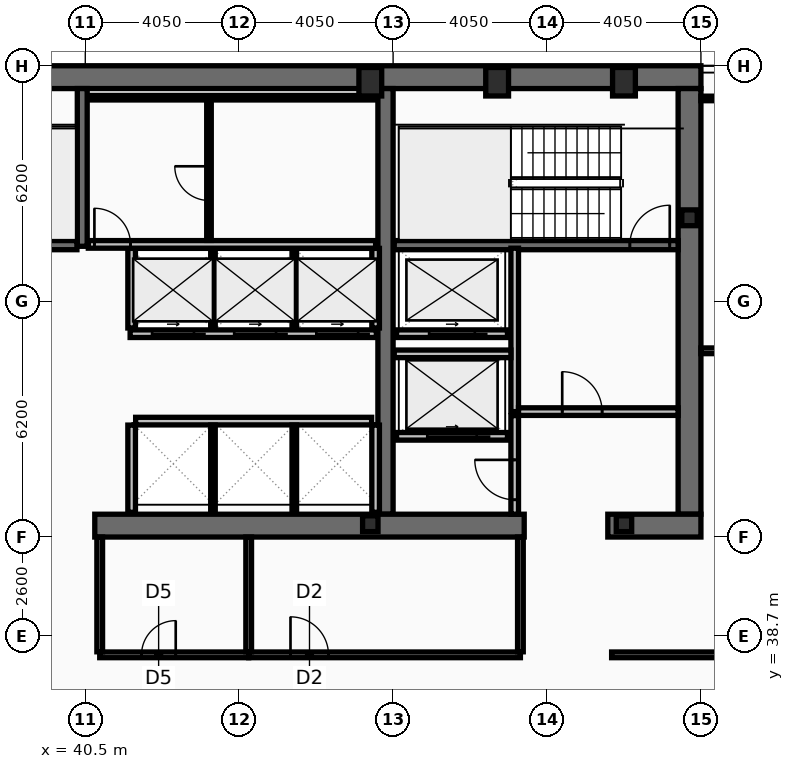
"""IFC4 building model, lengths in metres.
Left out: names, types, materials, properties, quantities, classifications, styles, units other than length and angle.
Written with IfcOpenShell. Run it as: python <this file> out.ifc"""

import sys

from ifc_helpers import new_model, si_unit, direction, frame, frame_2d, origin, origin_2d, place, context, subcontext, project, spatial, rectangle, hollow_rectangle, i_section, extrude, element, fill, save


model = new_model("IFC4")
c1 = context("Model", 3, precision=1e-05, world=origin(), true_north=direction((0.0, 1.0)))
c2 = subcontext(c1, "Body", "Model", "MODEL_VIEW")
j1 = project(units=[si_unit("LENGTHUNIT", "METRE"), si_unit("PLANEANGLEUNIT", "RADIAN")], contexts=[c1])
p1 = place(None, origin())
s1 = spatial("IfcSite", under=j1, at=p1, CompositionType="ELEMENT")
p2 = place(p1, origin())
s2 = spatial("IfcBuilding", under=s1, at=p2, CompositionType="ELEMENT")
p3 = place(p2, frame((0.0, 0.0, 195.8)))
s3 = spatial("IfcBuildingStorey", under=s2, at=p3, CompositionType="ELEMENT", Elevation=195.8)
p4 = place(p3, frame((16.2, 53.4, 0.0), z_axis=(0.0, 0.0, 1.0), x_axis=(1.0, 0.0, 0.0)))
e1 = element("IfcWall", 1, at=p4, inside=s3, PredefinedType="SHEAR", context=c2, shape_type="SweptSolid", body=[
    extrude(rectangle(XDim=40.5, YDim=0.6, at=frame_2d((20.25, 0.0))), origin(), (0.0, 0.0, 1.0), 3.44),
])
p5 = place(p3, frame((56.4, 53.1, 0.0), z_axis=(0.0, 0.0, 1.0), x_axis=(0.0, -1.0, 0.0)))
e2 = element("IfcWall", 2, at=p5, inside=s3, PredefinedType="SHEAR", context=c2, shape_type="SweptSolid", body=[
    extrude(rectangle(XDim=11.2, YDim=0.6, at=frame_2d((5.6, 0.0))), origin(), (0.0, 0.0, 1.0), 3.44),
])
p6 = place(p3, frame((48.4, 41.9, 0.0), z_axis=(0.0, 0.0, 1.0), x_axis=(0.0, 1.0, 0.0)))
e3 = element("IfcWall", 3, at=p6, inside=s3, PredefinedType="SHEAR", context=c2, shape_type="SweptSolid", body=[
    extrude(rectangle(XDim=11.2, YDim=0.4, at=frame_2d((5.6, 0.0))), origin(), (0.0, 0.0, 1.0), 3.44),
])
p7 = place(p3, frame((52.05, 41.6, 0.0), z_axis=(0.0, 0.0, 1.0), x_axis=(-1.0, 0.0, 0.0)))
e4 = element("IfcWall", 4, at=p7, inside=s3, PredefinedType="SHEAR", context=c2, shape_type="SweptSolid", body=[
    extrude(rectangle(XDim=11.3, YDim=0.6, at=frame_2d((5.65, 0.0))), origin(), (0.0, 0.0, 1.0), 3.44),
])
p8 = place(p3, frame((56.7, 41.6, 0.0), z_axis=(0.0, 0.0, 1.0), x_axis=(-1.0, 0.0, 0.0)))
e5 = element("IfcWall", 5, at=p8, inside=s3, PredefinedType="SHEAR", context=c2, shape_type="SweptSolid", body=[
    extrude(rectangle(XDim=2.45, YDim=0.6, at=frame_2d((1.225, 0.0))), origin(), (0.0, 0.0, 1.0), 3.44),
])
p9 = place(p3, frame((40.42, 48.95, 0.0), z_axis=(0.0, 0.0, 1.0), x_axis=(0.0, 1.0, 0.0)))
e6 = element("IfcWall", 6, at=p9, inside=s3, PredefinedType="SHEAR", context=c2, shape_type="SweptSolid", body=[
    extrude(rectangle(XDim=4.15, YDim=0.26, at=frame_2d((2.075, 0.0))), origin(), (0.0, 0.0, 1.0), 3.44),
])
p10 = place(p3, frame((48.63, 48.98, 0.0), z_axis=(0.0, 0.0, 1.0), x_axis=(1.0, 0.0, 0.0)))
e7 = element("IfcWall", 7, at=p10, inside=s3, PredefinedType="SHEAR", context=c2, shape_type="SweptSolid", body=[
    extrude(rectangle(XDim=7.47, YDim=0.24, at=frame_2d((3.735, 0.0))), origin(), (0.0, 0.0, 1.0), 3.44),
])
p11 = place(p10, frame((6.2, 0.0, 0.0)))
e8 = element("IfcOpeningElement", 8, at=p11, cuts=e7, PredefinedType="OPENING", context=c2, shape_type="SweptSolid", body=[
    extrude(rectangle(XDim=1.05, YDim=2.15, at=frame_2d((0.525, 1.075))), frame((0.0, 0.13, 0.0), z_axis=(0.0, -1.0, 0.0), x_axis=(1.0, 0.0, 0.0)), (0.0, 0.0, 1.0), 0.26),
])
p12 = place(p3, frame((32.72, 48.98, 0.0), z_axis=(0.0, 0.0, 1.0), x_axis=(1.0, 0.0, 0.0)))
e9 = element("IfcWall", 9, at=p12, inside=s3, PredefinedType="SHEAR", context=c2, shape_type="SweptSolid", body=[
    extrude(rectangle(XDim=7.56, YDim=0.24, at=frame_2d((3.78, 0.0))), origin(), (0.0, 0.0, 1.0), 3.44),
])
p13 = place(p12, frame((0.22, 0.0, 0.0)))
e10 = element("IfcOpeningElement", 10, at=p13, cuts=e9, PredefinedType="OPENING", context=c2, shape_type="SweptSolid", body=[
    extrude(rectangle(XDim=1.05, YDim=2.15, at=frame_2d((0.525, 1.075))), frame((0.0, 0.13, 0.0), z_axis=(0.0, -1.0, 0.0), x_axis=(1.0, 0.0, 0.0)), (0.0, 0.0, 1.0), 0.26),
])
for number, where, z_axis, x_axis in (
    (11, (48.0, 53.28, 0.0), (0.0, 0.0, 1.0), (1.0, 0.0, 0.0)),
    (12, (51.337, 53.28, 0.0), (0.0, 0.0, 1.0), (1.0, 0.0, 0.0)),
    (13, (54.675, 53.28, 0.0), (0.0, 0.0, 1.0), (1.0, 0.0, 0.0)),
):
    element("IfcColumn", number, at=place(p3, frame(where, z_axis=z_axis, x_axis=x_axis)), inside=s3, PredefinedType="COLUMN", context=c2, shape_type="SweptSolid", body=[
        extrude(hollow_rectangle(XDim=0.6, YDim=0.75, WallThickness=0.045, at=origin_2d()), origin(), (0.0, 0.0, 1.0), 3.6),
    ])
for number, where, z_axis, x_axis in (
    (14, (56.4, 49.7, 0.0), (0.0, 0.0, 1.0), (1.0, 0.0, 0.0)),
    (15, (48.0, 41.65, 0.0), (0.0, 0.0, 1.0), (1.0, 0.0, 0.0)),
    (16, (54.675, 41.65, 0.0), (0.0, 0.0, 1.0), (1.0, 0.0, 0.0)),
):
    element("IfcColumn", number, at=place(p3, frame(where, z_axis=z_axis, x_axis=x_axis)), inside=s3, PredefinedType="COLUMN", context=c2, shape_type="SweptSolid", body=[
        extrude(i_section(OverallWidth=0.406, OverallDepth=0.416, WebThickness=0.03, FlangeThickness=0.048, at=origin_2d()), origin(), (0.0, 0.0, 1.0), 3.6),
    ])
p14 = place(p3, frame((51.61, 43.95, 0.0), z_axis=(0.0, 0.0, 1.0), x_axis=(-1.0, 0.0, 0.0)))
e17 = element("IfcWall", 17, at=p14, inside=s3, PredefinedType="PARTITIONING", context=c2, shape_type="SweptSolid", body=[
    extrude(rectangle(XDim=2.92, YDim=0.2, at=frame_2d((1.46, 0.0))), origin(), (0.0, 0.0, 1.0), 3.44),
])
p15 = place(p14, frame((0.81, 0.0, 0.0)))
e18 = element("IfcOpeningElement", 18, at=p15, cuts=e17, PredefinedType="OPENING", context=c2, shape_type="SweptSolid", body=[
    extrude(rectangle(XDim=1.3, YDim=2.18, at=frame_2d((0.65, 1.09))), frame((0.0, 0.11, 0.0), z_axis=(0.0, -1.0, 0.0), x_axis=(1.0, 0.0, 0.0)), (0.0, 0.0, 1.0), 0.22),
])
p16 = place(p3, frame((51.61, 46.65, 0.0), z_axis=(0.0, 0.0, 1.0), x_axis=(-1.0, 0.0, 0.0)))
e19 = element("IfcWall", 19, at=p16, inside=s3, PredefinedType="PARTITIONING", context=c2, shape_type="SweptSolid", body=[
    extrude(rectangle(XDim=2.92, YDim=0.2, at=frame_2d((1.46, 0.0))), origin(), (0.0, 0.0, 1.0), 3.44),
])
p17 = place(p16, frame((0.86, 0.0, 0.0)))
e20 = element("IfcOpeningElement", 20, at=p17, cuts=e19, PredefinedType="OPENING", context=c2, shape_type="SweptSolid", body=[
    extrude(rectangle(XDim=1.2, YDim=2.18, at=frame_2d((0.6, 1.09))), frame((0.0, 0.11, 0.0), z_axis=(0.0, -1.0, 0.0), x_axis=(1.0, 0.0, 0.0)), (0.0, 0.0, 1.0), 0.22),
])
p18 = place(p3, frame((48.16, 46.65, 0.0), z_axis=(0.0, 0.0, 1.0), x_axis=(-1.0, 0.0, 0.0)))
e21 = element("IfcWall", 21, at=p18, inside=s3, PredefinedType="PARTITIONING", context=c2, shape_type="SweptSolid", body=[
    extrude(rectangle(XDim=6.48, YDim=0.2, at=frame_2d((3.24, 0.0))), origin(), (0.0, 0.0, 1.0), 3.44),
])
p19 = place(p18, frame((4.8, 0.0, 0.0)))
e22 = element("IfcOpeningElement", 22, at=p19, cuts=e21, PredefinedType="OPENING", context=c2, shape_type="SweptSolid", body=[
    extrude(rectangle(XDim=1.1, YDim=2.18, at=frame_2d((0.55, 1.09))), frame((0.0, 0.11, 0.0), z_axis=(0.0, -1.0, 0.0), x_axis=(1.0, 0.0, 0.0)), (0.0, 0.0, 1.0), 0.22),
])
p20 = place(p18, frame((2.64, 0.0, 0.0)))
e23 = element("IfcOpeningElement", 23, at=p20, cuts=e21, PredefinedType="OPENING", context=c2, shape_type="SweptSolid", body=[
    extrude(rectangle(XDim=1.1, YDim=2.18, at=frame_2d((0.55, 1.09))), frame((0.0, 0.11, 0.0), z_axis=(0.0, -1.0, 0.0), x_axis=(1.0, 0.0, 0.0)), (0.0, 0.0, 1.0), 0.22),
])
p21 = place(p18, frame((0.48, 0.0, 0.0)))
e24 = element("IfcOpeningElement", 24, at=p21, cuts=e21, PredefinedType="OPENING", context=c2, shape_type="SweptSolid", body=[
    extrude(rectangle(XDim=1.1, YDim=2.18, at=frame_2d((0.55, 1.09))), frame((0.0, 0.11, 0.0), z_axis=(0.0, -1.0, 0.0), x_axis=(1.0, 0.0, 0.0)), (0.0, 0.0, 1.0), 0.22),
])
p22 = place(p3, frame((51.8, 44.6, 0.0), z_axis=(0.0, 0.0, 1.0), x_axis=(0.0, 1.0, 0.0)))
e25 = element("IfcWall", 25, at=p22, inside=s3, PredefinedType="PARTITIONING", context=c2, shape_type="SweptSolid", body=[
    extrude(rectangle(XDim=4.3, YDim=0.2, at=frame_2d((2.15, 0.0))), origin(), (0.0, 0.0, 1.0), 3.44),
])
p23 = place(p3, frame((51.9, 44.6, 0.0), z_axis=(0.0, 0.0, 1.0), x_axis=(1.0, 0.0, 0.0)))
e26 = element("IfcWall", 26, at=p23, inside=s3, PredefinedType="PARTITIONING", context=c2, shape_type="SweptSolid", body=[
    extrude(rectangle(XDim=4.2, YDim=0.2, at=frame_2d((2.1, 0.0))), origin(), (0.0, 0.0, 1.0), 3.44),
])
p24 = place(p23, frame((1.15, 0.0, 0.0)))
e27 = element("IfcOpeningElement", 27, at=p24, cuts=e26, PredefinedType="OPENING", context=c2, shape_type="SweptSolid", body=[
    extrude(rectangle(XDim=1.05, YDim=2.15, at=frame_2d((0.525, 1.075))), frame((0.0, 0.11, 0.0), z_axis=(0.0, -1.0, 0.0), x_axis=(1.0, 0.0, 0.0)), (0.0, 0.0, 1.0), 0.22),
])
p25 = place(p3, frame((48.63, 46.12, 0.0), z_axis=(0.0, 0.0, 1.0), x_axis=(1.0, 0.0, 0.0)))
e28 = element("IfcWall", 28, at=p25, inside=s3, PredefinedType="PARTITIONING", context=c2, shape_type="SweptSolid", body=[
    extrude(rectangle(XDim=3.07, YDim=0.2, at=frame_2d((1.535, 0.0))), origin(), (0.0, 0.0, 1.0), 3.44),
])
p26 = place(p3, frame((51.8, 41.9, 0.0), z_axis=(0.0, 0.0, 1.0), x_axis=(0.0, 1.0, 0.0)))
e29 = element("IfcWall", 29, at=p26, inside=s3, PredefinedType="PARTITIONING", context=c2, shape_type="SweptSolid", body=[
    extrude(rectangle(XDim=2.595, YDim=0.2, at=frame_2d((1.298, 0.0))), origin(), (0.0, 0.0, 1.0), 3.44),
])
p27 = place(p26, frame((0.38, 0.0, 0.0)))
e30 = element("IfcOpeningElement", 30, at=p27, cuts=e29, PredefinedType="OPENING", context=c2, shape_type="SweptSolid", body=[
    extrude(rectangle(XDim=1.05, YDim=2.15, at=frame_2d((0.525, 1.075))), frame((0.0, 0.11, 0.0), z_axis=(0.0, -1.0, 0.0), x_axis=(1.0, 0.0, 0.0)), (0.0, 0.0, 1.0), 0.22),
])
for number, where, z_axis, x_axis in (
    (31, (41.72, 46.8, 0.0), (0.0, 0.0, 1.0), (0.0, 1.0, 0.0)),
    (32, (48.14, 46.8, 0.0), (0.0, 0.0, 1.0), (0.0, 1.0, 0.0)),
):
    element("IfcWall", number, at=place(p3, frame(where, z_axis=z_axis, x_axis=x_axis)), inside=s3, PredefinedType="PARTITIONING", context=c2, shape_type="SweptSolid", body=[
        extrude(rectangle(XDim=2.095, YDim=0.2, at=frame_2d((1.047, 0.0))), origin(), (0.0, 0.0, 1.0), 3.44),
    ])
for number, where, z_axis, x_axis in (
    (33, (43.86, 46.8, 0.0), (0.0, 0.0, 1.0), (0.0, 1.0, 0.0)),
    (34, (46.0, 46.8, 0.0), (0.0, 0.0, 1.0), (0.0, 1.0, 0.0)),
):
    element("IfcWall", number, at=place(p3, frame(where, z_axis=z_axis, x_axis=x_axis)), inside=s3, PredefinedType="PARTITIONING", context=c2, shape_type="SweptSolid", body=[
        extrude(rectangle(XDim=2.095, YDim=0.12, at=frame_2d((1.047, 0.0))), origin(), (0.0, 0.0, 1.0), 3.44),
    ])
p28 = place(p3, frame((41.825, 44.35, 0.0), z_axis=(0.0, 0.0, 1.0), x_axis=(1.0, 0.0, 0.0)))
e35 = element("IfcWall", 35, at=p28, inside=s3, PredefinedType="PARTITIONING", context=c2, shape_type="SweptSolid", body=[
    extrude(rectangle(XDim=6.21, YDim=0.2, at=frame_2d((3.105, 0.0))), origin(), (0.0, 0.0, 1.0), 3.44),
])
for number, where, z_axis, x_axis in (
    (36, (41.72, 41.95, 0.0), (0.0, 0.0, 1.0), (0.0, 1.0, 0.0)),
    (37, (48.14, 41.95, 0.0), (0.0, 0.0, 1.0), (0.0, 1.0, 0.0)),
):
    element("IfcWall", number, at=place(p3, frame(where, z_axis=z_axis, x_axis=x_axis)), inside=s3, PredefinedType="PARTITIONING", context=c2, shape_type="SweptSolid", body=[
        extrude(rectangle(XDim=2.295, YDim=0.2, at=frame_2d((1.147, 0.0))), origin(), (0.0, 0.0, 1.0), 3.44),
    ])
for number, where, z_axis, x_axis in (
    (38, (43.86, 41.95, 0.0), (0.0, 0.0, 1.0), (0.0, 1.0, 0.0)),
    (39, (46.0, 41.95, 0.0), (0.0, 0.0, 1.0), (0.0, 1.0, 0.0)),
):
    element("IfcWall", number, at=place(p3, frame(where, z_axis=z_axis, x_axis=x_axis)), inside=s3, PredefinedType="PARTITIONING", context=c2, shape_type="SweptSolid", body=[
        extrude(rectangle(XDim=2.295, YDim=0.12, at=frame_2d((1.147, 0.0))), origin(), (0.0, 0.0, 1.0), 3.44),
    ])
p29 = place(p3, frame((40.58, 52.86, 0.0), z_axis=(0.0, 0.0, 1.0), x_axis=(1.0, 0.0, 0.0)))
e40 = element("IfcWall", 40, at=p29, inside=s3, PredefinedType="PARTITIONING", context=c2, shape_type="SweptSolid", body=[
    extrude(rectangle(XDim=7.56, YDim=0.12, at=frame_2d((3.78, 0.0))), origin(), (0.0, 0.0, 1.0), 3.44),
])
p30 = place(p3, frame((40.58, 49.0, 0.0), z_axis=(0.0, 0.0, 1.0), x_axis=(1.0, 0.0, 0.0)))
e41 = element("IfcWall", 41, at=p30, inside=s3, PredefinedType="PARTITIONING", context=c2, shape_type="SweptSolid", body=[
    extrude(rectangle(XDim=7.56, YDim=0.2, at=frame_2d((3.78, 0.0))), origin(), (0.0, 0.0, 1.0), 3.44),
])
p31 = place(p30, frame((0.16, 0.0, 0.0)))
e42 = element("IfcOpeningElement", 42, at=p31, cuts=e41, PredefinedType="OPENING", context=c2, shape_type="SweptSolid", body=[
    extrude(rectangle(XDim=0.95, YDim=2.1, at=frame_2d((0.475, 1.05))), frame((0.0, 0.11, 0.0), z_axis=(0.0, -1.0, 0.0), x_axis=(1.0, 0.0, 0.0)), (0.0, 0.0, 1.0), 0.22),
])
p32 = place(p3, frame((43.755, 49.105, 0.0), z_axis=(0.0, 0.0, 1.0), x_axis=(0.0, 1.0, 0.0)))
e43 = element("IfcWall", 43, at=p32, inside=s3, PredefinedType="PARTITIONING", context=c2, shape_type="SweptSolid", body=[
    extrude(rectangle(XDim=3.69, YDim=0.12, at=frame_2d((1.845, 0.0))), origin(), (0.0, 0.0, 1.0), 3.44),
])
p33 = place(p32, frame((1.05, 0.0, 0.0)))
e44 = element("IfcOpeningElement", 44, at=p33, cuts=e43, PredefinedType="OPENING", context=c2, shape_type="SweptSolid", body=[
    extrude(rectangle(XDim=0.9, YDim=2.05, at=frame_2d((0.45, 1.025))), frame((0.0, 0.07, 0.0), z_axis=(0.0, -1.0, 0.0), x_axis=(1.0, 0.0, 0.0)), (0.0, 0.0, 1.0), 0.14),
])
p34 = place(p3, frame((40.88, 38.2, 0.0), z_axis=(0.0, 0.0, 1.0), x_axis=(1.0, 0.0, 0.0)))
e45 = element("IfcWall", 45, at=p34, inside=s3, PredefinedType="PARTITIONING", context=c2, shape_type="SweptSolid", body=[
    extrude(rectangle(XDim=3.92, YDim=0.15, at=frame_2d((1.96, 0.0))), origin(), (0.0, 0.0, 1.0), 2.73),
])
p35 = place(p34, frame((1.1, 0.0, 0.0)))
e46 = element("IfcOpeningElement", 46, at=p35, cuts=e45, PredefinedType="OPENING", context=c2, shape_type="SweptSolid", body=[
    extrude(rectangle(XDim=0.9, YDim=2.05, at=frame_2d((0.45, 1.025))), frame((0.0, 0.085, 0.0), z_axis=(0.0, -1.0, 0.0), x_axis=(1.0, 0.0, 0.0)), (0.0, 0.0, 1.0), 0.17),
])
p36 = place(p3, frame((44.8, 38.2, 0.0), z_axis=(0.0, 0.0, 1.0), x_axis=(1.0, 0.0, 0.0)))
e47 = element("IfcWall", 47, at=p36, inside=s3, PredefinedType="PARTITIONING", context=c2, shape_type="SweptSolid", body=[
    extrude(rectangle(XDim=7.15, YDim=0.15, at=frame_2d((3.575, 0.0))), origin(), (0.0, 0.0, 1.0), 2.73),
])
p37 = place(p36, frame((1.1, 0.0, 0.0)))
e48 = element("IfcOpeningElement", 48, at=p37, cuts=e47, PredefinedType="OPENING", context=c2, shape_type="SweptSolid", body=[
    extrude(rectangle(XDim=1.0, YDim=2.05, at=frame_2d((0.5, 1.025))), frame((0.0, 0.085, 0.0), z_axis=(0.0, -1.0, 0.0), x_axis=(1.0, 0.0, 0.0)), (0.0, 0.0, 1.0), 0.17),
])
for number, where, z_axis, x_axis in (
    (49, (40.88, 38.28, 0.0), (0.0, 0.0, 1.0), (0.0, 1.0, 0.0)),
    (50, (44.8, 38.28, 0.0), (0.0, 0.0, 1.0), (0.0, 1.0, 0.0)),
    (51, (51.95, 38.28, 0.0), (0.0, 0.0, 1.0), (0.0, 1.0, 0.0)),
):
    element("IfcWall", number, at=place(p3, frame(where, z_axis=z_axis, x_axis=x_axis)), inside=s3, PredefinedType="PARTITIONING", context=c2, shape_type="SweptSolid", body=[
        extrude(rectangle(XDim=3.02, YDim=0.15, at=frame_2d((1.51, 0.0))), origin(), (0.0, 0.0, 1.0), 3.44),
    ])
p38 = place(p3, frame((54.35, 38.2, 0.0), z_axis=(0.0, 0.0, 1.0), x_axis=(1.0, 0.0, 0.0)))
e52 = element("IfcWall", 52, at=p38, inside=s3, PredefinedType="PARTITIONING", context=c2, shape_type="SweptSolid", body=[
    extrude(rectangle(XDim=10.52, YDim=0.15, at=frame_2d((5.26, 0.0))), origin(), (0.0, 0.0, 1.0), 2.73),
])
p39 = place(p38, frame((3.25, 0.0, 0.0)))
e53 = element("IfcOpeningElement", 53, at=p39, cuts=e52, PredefinedType="OPENING", context=c2, shape_type="SweptSolid", body=[
    extrude(rectangle(XDim=0.95, YDim=2.05, at=frame_2d((0.475, 1.025))), frame((0.0, 0.085, 0.0), z_axis=(0.0, -1.0, 0.0), x_axis=(1.0, 0.0, 0.0)), (0.0, 0.0, 1.0), 0.17),
])
p40 = place(p3, frame((56.7, 46.2, 0.0), z_axis=(0.0, 0.0, 1.0), x_axis=(1.0, 0.0, 0.0)))
e54 = element("IfcWall", 54, at=p40, inside=s3, PredefinedType="PARTITIONING", context=c2, shape_type="SweptSolid", body=[
    extrude(rectangle(XDim=8.105, YDim=0.15, at=frame_2d((4.052, 0.0))), origin(), (0.0, 0.0, 1.0), 2.83),
])
p41 = place(p40, frame((0.9, 0.0, 0.0)))
e55 = element("IfcOpeningElement", 55, at=p41, cuts=e54, PredefinedType="OPENING", context=c2, shape_type="SweptSolid", body=[
    extrude(rectangle(XDim=0.9, YDim=2.05, at=frame_2d((0.45, 1.025))), frame((0.0, 0.085, 0.0), z_axis=(0.0, -1.0, 0.0), x_axis=(1.0, 0.0, 0.0)), (0.0, 0.0, 1.0), 0.17),
])
p42 = place(p3, frame((56.7, 52.84, 0.0), z_axis=(0.0, 0.0, 1.0), x_axis=(1.0, 0.0, 0.0)))
e56 = element("IfcWall", 56, at=p42, inside=s3, PredefinedType="PARTITIONING", context=c2, shape_type="SweptSolid", body=[
    extrude(rectangle(XDim=8.105, YDim=0.12, at=frame_2d((4.052, 0.0))), origin(), (0.0, 0.0, 1.0), 3.44),
])
p43 = place(p11, origin())
e57 = element("IfcDoor", 57, at=p43, inside=s3, OperationType="SINGLE_SWING_RIGHT", PredefinedType="DOOR", context=c2, shape_type="SweptSolid", body=[
    extrude(rectangle(XDim=1.05, YDim=2.15, at=frame_2d((0.525, 1.075))), frame((0.0, 0.025, 0.0), z_axis=(0.0, -1.0, 0.0), x_axis=(1.0, 0.0, 0.0)), (0.0, 0.0, 1.0), 0.05),
])
fill(e8, e57)
p44 = place(p15, origin())
e58 = element("IfcDoor", 58, at=p44, inside=s3, OperationType="SLIDING_TO_LEFT", PredefinedType="DOOR", context=c2, shape_type="SweptSolid", body=[
    extrude(rectangle(XDim=1.3, YDim=2.18, at=frame_2d((0.65, 1.09))), frame((0.0, 0.025, 0.0), z_axis=(0.0, -1.0, 0.0), x_axis=(1.0, 0.0, 0.0)), (0.0, 0.0, 1.0), 0.05),
])
fill(e18, e58)
p45 = place(p17, origin())
e59 = element("IfcDoor", 59, at=p45, inside=s3, OperationType="SLIDING_TO_LEFT", PredefinedType="DOOR", context=c2, shape_type="SweptSolid", body=[
    extrude(rectangle(XDim=1.2, YDim=2.18, at=frame_2d((0.6, 1.09))), frame((0.0, 0.025, 0.0), z_axis=(0.0, -1.0, 0.0), x_axis=(1.0, 0.0, 0.0)), (0.0, 0.0, 1.0), 0.05),
])
fill(e20, e59)
p46 = place(p19, origin())
e60 = element("IfcDoor", 60, at=p46, inside=s3, OperationType="SLIDING_TO_LEFT", PredefinedType="DOOR", context=c2, shape_type="SweptSolid", body=[
    extrude(rectangle(XDim=1.1, YDim=2.18, at=frame_2d((0.55, 1.09))), frame((0.0, 0.025, 0.0), z_axis=(0.0, -1.0, 0.0), x_axis=(1.0, 0.0, 0.0)), (0.0, 0.0, 1.0), 0.05),
])
fill(e22, e60)
p47 = place(p20, origin())
e61 = element("IfcDoor", 61, at=p47, inside=s3, OperationType="SLIDING_TO_LEFT", PredefinedType="DOOR", context=c2, shape_type="SweptSolid", body=[
    extrude(rectangle(XDim=1.1, YDim=2.18, at=frame_2d((0.55, 1.09))), frame((0.0, 0.025, 0.0), z_axis=(0.0, -1.0, 0.0), x_axis=(1.0, 0.0, 0.0)), (0.0, 0.0, 1.0), 0.05),
])
fill(e23, e61)
p48 = place(p21, origin())
e62 = element("IfcDoor", 62, at=p48, inside=s3, OperationType="SLIDING_TO_LEFT", PredefinedType="DOOR", context=c2, shape_type="SweptSolid", body=[
    extrude(rectangle(XDim=1.1, YDim=2.18, at=frame_2d((0.55, 1.09))), frame((0.0, 0.025, 0.0), z_axis=(0.0, -1.0, 0.0), x_axis=(1.0, 0.0, 0.0)), (0.0, 0.0, 1.0), 0.05),
])
fill(e24, e62)
p49 = place(p24, origin())
e63 = element("IfcDoor", 63, at=p49, inside=s3, OperationType="SINGLE_SWING_LEFT", PredefinedType="DOOR", context=c2, shape_type="SweptSolid", body=[
    extrude(rectangle(XDim=1.05, YDim=2.15, at=frame_2d((0.525, 1.075))), frame((0.0, 0.025, 0.0), z_axis=(0.0, -1.0, 0.0), x_axis=(1.0, 0.0, 0.0)), (0.0, 0.0, 1.0), 0.05),
])
fill(e27, e63)
p50 = place(p27, origin())
e64 = element("IfcDoor", 64, at=p50, inside=s3, OperationType="SINGLE_SWING_RIGHT", PredefinedType="DOOR", context=c2, shape_type="SweptSolid", body=[
    extrude(rectangle(XDim=1.05, YDim=2.15, at=frame_2d((0.525, 1.075))), frame((0.0, 0.025, 0.0), z_axis=(0.0, -1.0, 0.0), x_axis=(1.0, 0.0, 0.0)), (0.0, 0.0, 1.0), 0.05),
])
fill(e30, e64)
p51 = place(p31, origin())
e65 = element("IfcDoor", 65, at=p51, inside=s3, OperationType="SINGLE_SWING_LEFT", PredefinedType="DOOR", context=c2, shape_type="SweptSolid", body=[
    extrude(rectangle(XDim=0.95, YDim=2.1, at=frame_2d((0.475, 1.05))), frame((0.0, 0.025, 0.0), z_axis=(0.0, -1.0, 0.0), x_axis=(1.0, 0.0, 0.0)), (0.0, 0.0, 1.0), 0.05),
])
fill(e42, e65)
p52 = place(p33, origin())
e66 = element("IfcDoor", 66, at=p52, inside=s3, OperationType="SINGLE_SWING_RIGHT", PredefinedType="DOOR", context=c2, shape_type="SweptSolid", body=[
    extrude(rectangle(XDim=0.9, YDim=2.05, at=frame_2d((0.45, 1.025))), frame((0.0, 0.025, 0.0), z_axis=(0.0, -1.0, 0.0), x_axis=(1.0, 0.0, 0.0)), (0.0, 0.0, 1.0), 0.05),
])
fill(e44, e66)
p53 = place(p35, origin())
e67 = element("IfcDoor", 67, at=p53, inside=s3, OperationType="SINGLE_SWING_RIGHT", PredefinedType="DOOR", context=c2, shape_type="SweptSolid", body=[
    extrude(rectangle(XDim=0.9, YDim=2.05, at=frame_2d((0.45, 1.025))), frame((0.0, 0.025, 0.0), z_axis=(0.0, -1.0, 0.0), x_axis=(1.0, 0.0, 0.0)), (0.0, 0.0, 1.0), 0.05),
])
fill(e46, e67)
p54 = place(p37, origin())
e68 = element("IfcDoor", 68, at=p54, inside=s3, OperationType="SINGLE_SWING_LEFT", PredefinedType="DOOR", context=c2, shape_type="SweptSolid", body=[
    extrude(rectangle(XDim=1.0, YDim=2.05, at=frame_2d((0.5, 1.025))), frame((0.0, 0.025, 0.0), z_axis=(0.0, -1.0, 0.0), x_axis=(1.0, 0.0, 0.0)), (0.0, 0.0, 1.0), 0.05),
])
fill(e48, e68)
save(model, sys.argv[1])
